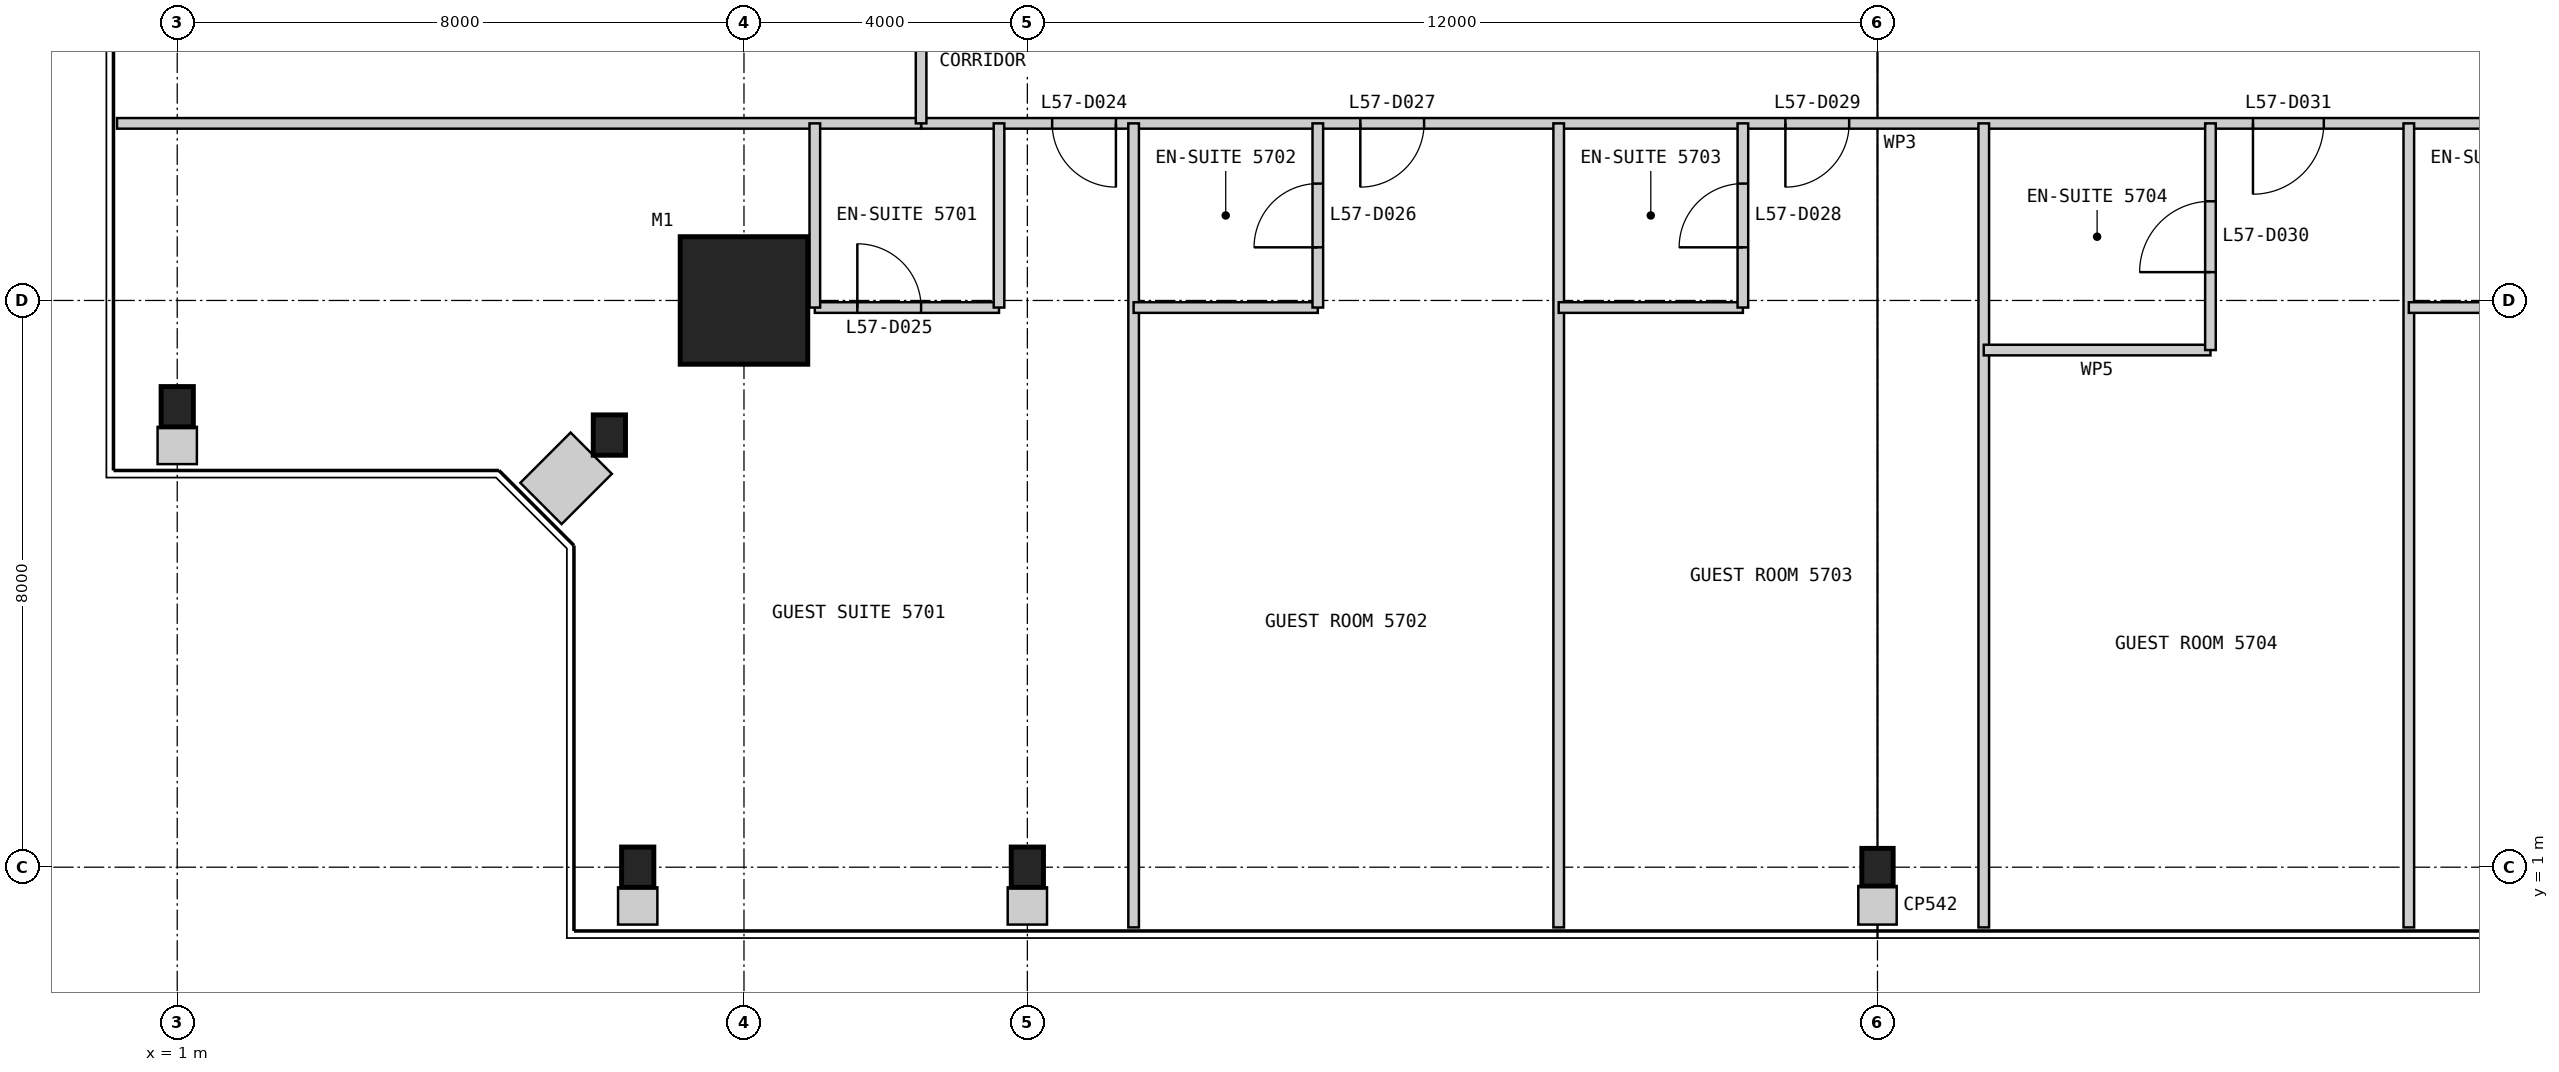
"""IFC4 building model, lengths in metres.
Left out: names, types, materials, properties, quantities, classifications, styles, units other than length and angle.
Written with IfcOpenShell. Run it as: python <this file> out.ifc"""

import sys

from ifc_helpers import new_model, si_unit, direction, frame, frame_2d, origin, origin_2d, place, context, subcontext, project, spatial, rectangle, i_section, extrude, element, fill, save


model = new_model("IFC4")
c1 = context("Model", 3, precision=1e-05, world=origin(), true_north=direction((0.0, 1.0)))
c2 = subcontext(c1, "Body", "Model", "MODEL_VIEW")
j1 = project(units=[si_unit("LENGTHUNIT", "METRE"), si_unit("PLANEANGLEUNIT", "RADIAN")], contexts=[c1])
p1 = place(None, origin())
s1 = spatial("IfcSite", under=j1, at=p1, CompositionType="ELEMENT")
p2 = place(p1, origin())
s2 = spatial("IfcBuilding", under=s1, at=p2, CompositionType="ELEMENT")
p3 = place(p2, frame((0.0, 0.0, 245.8)))
s3 = spatial("IfcBuildingStorey", under=s2, at=p3, CompositionType="ELEMENT", Elevation=245.8)
p4 = place(p3, frame((9.0, 9.0, 0.0), z_axis=(0.0, 0.0, 1.0), x_axis=(1.0, 0.0, 0.0)))
e1 = element("IfcColumn", 1, at=p4, inside=s3, PredefinedType="COLUMN", context=c2, shape_type="SweptSolid", body=[
    extrude(rectangle(XDim=1.8, YDim=1.8, at=origin_2d()), origin(), (0.0, 0.0, 1.0), 3.4),
])
for number, where, z_axis, x_axis in (
    (2, (7.5, 1.0, 0.0), (0.0, 0.0, 1.0), (1.0, 0.0, 0.0)),
    (3, (13.0, 1.0, 0.0), (0.0, 0.0, 1.0), (1.0, 0.0, 0.0)),
):
    element("IfcColumn", number, at=place(p3, frame(where, z_axis=z_axis, x_axis=x_axis)), inside=s3, PredefinedType="COLUMN", context=c2, shape_type="SweptSolid", body=[
        extrude(i_section(OverallWidth=0.455, OverallDepth=0.569, WebThickness=0.078, FlangeThickness=0.125, at=origin_2d()), origin(), (0.0, 0.0, 1.0), 3.4),
    ])
p5 = place(p3, frame((25.0, 1.0, 0.0), z_axis=(0.0, 0.0, 1.0), x_axis=(1.0, 0.0, 0.0)))
e4 = element("IfcColumn", 4, at=p5, inside=s3, PredefinedType="COLUMN", context=c2, shape_type="SweptSolid", body=[
    extrude(i_section(OverallWidth=0.442, OverallDepth=0.531, WebThickness=0.066, FlangeThickness=0.106, at=origin_2d()), origin(), (0.0, 0.0, 1.0), 3.4),
])
for number, where, z_axis, x_axis in (
    (5, (1.0, 7.5, 0.0), (0.0, 0.0, 1.0), (1.0, 0.0, 0.0)),
    (6, (7.1, 7.1, 0.0), (0.0, 0.0, 1.0), (1.0, 0.0, 0.0)),
):
    element("IfcColumn", number, at=place(p3, frame(where, z_axis=z_axis, x_axis=x_axis)), inside=s3, PredefinedType="COLUMN", context=c2, shape_type="SweptSolid", body=[
        extrude(i_section(OverallWidth=0.455, OverallDepth=0.569, WebThickness=0.078, FlangeThickness=0.125, at=origin_2d()), origin(), (0.0, 0.0, 1.0), 3.4),
    ])
p6 = place(p3, frame((11.5, 11.5, 0.0), z_axis=(0.0, 0.0, 1.0), x_axis=(1.0, 0.0, 0.0)))
e7 = element("IfcWall", 7, at=p6, inside=s3, PredefinedType="PARTITIONING", context=c2, shape_type="SweptSolid", body=[
    extrude(rectangle(XDim=27.0, YDim=0.15, at=frame_2d((13.5, 0.0))), origin(), (0.0, 0.0, 1.0), 3.25),
])
p7 = place(p6, frame((1.85, 0.0, 0.0)))
e8 = element("IfcOpeningElement", 8, at=p7, cuts=e7, PredefinedType="OPENING", context=c2, shape_type="SweptSolid", body=[
    extrude(rectangle(XDim=0.9, YDim=2.1, at=frame_2d((0.45, 1.05))), frame((0.0, 0.085, 0.0), z_axis=(0.0, -1.0, 0.0), x_axis=(1.0, 0.0, 0.0)), (0.0, 0.0, 1.0), 0.17),
])
p8 = place(p6, frame((6.2, 0.0, 0.0)))
e9 = element("IfcOpeningElement", 9, at=p8, cuts=e7, PredefinedType="OPENING", context=c2, shape_type="SweptSolid", body=[
    extrude(rectangle(XDim=0.9, YDim=2.1, at=frame_2d((0.45, 1.05))), frame((0.0, 0.085, 0.0), z_axis=(0.0, -1.0, 0.0), x_axis=(1.0, 0.0, 0.0)), (0.0, 0.0, 1.0), 0.17),
])
p9 = place(p6, frame((12.2, 0.0, 0.0)))
e10 = element("IfcOpeningElement", 10, at=p9, cuts=e7, PredefinedType="OPENING", context=c2, shape_type="SweptSolid", body=[
    extrude(rectangle(XDim=0.9, YDim=2.1, at=frame_2d((0.45, 1.05))), frame((0.0, 0.085, 0.0), z_axis=(0.0, -1.0, 0.0), x_axis=(1.0, 0.0, 0.0)), (0.0, 0.0, 1.0), 0.17),
])
p10 = place(p6, frame((18.8, 0.0, 0.0)))
e11 = element("IfcOpeningElement", 11, at=p10, cuts=e7, PredefinedType="OPENING", context=c2, shape_type="SweptSolid", body=[
    extrude(rectangle(XDim=1.0, YDim=2.1, at=frame_2d((0.5, 1.05))), frame((0.0, 0.085, 0.0), z_axis=(0.0, -1.0, 0.0), x_axis=(1.0, 0.0, 0.0)), (0.0, 0.0, 1.0), 0.17),
])
p11 = place(p6, frame((24.2, 0.0, 0.0)))
e12 = element("IfcOpeningElement", 12, at=p11, cuts=e7, PredefinedType="OPENING", context=c2, shape_type="SweptSolid", body=[
    extrude(rectangle(XDim=0.9, YDim=2.1, at=frame_2d((0.45, 1.05))), frame((0.0, 0.085, 0.0), z_axis=(0.0, -1.0, 0.0), x_axis=(1.0, 0.0, 0.0)), (0.0, 0.0, 1.0), 0.17),
])
p12 = place(p3, frame((0.15, 11.5, 0.0), z_axis=(0.0, 0.0, 1.0), x_axis=(1.0, 0.0, 0.0)))
e13 = element("IfcWall", 13, at=p12, inside=s3, PredefinedType="PARTITIONING", context=c2, shape_type="SweptSolid", body=[
    extrude(rectangle(XDim=11.35, YDim=0.15, at=frame_2d((5.675, 0.0))), origin(), (0.0, 0.0, 1.0), 3.25),
])
p13 = place(p3, frame((10.0, 8.9, 0.0), z_axis=(0.0, 0.0, 1.0), x_axis=(1.0, 0.0, 0.0)))
e14 = element("IfcWall", 14, at=p13, inside=s3, PredefinedType="PARTITIONING", context=c2, shape_type="SweptSolid", body=[
    extrude(rectangle(XDim=2.6, YDim=0.15, at=frame_2d((1.3, 0.0))), origin(), (0.0, 0.0, 1.0), 2.638),
])
p14 = place(p13, frame((0.6, 0.0, 0.0)))
e15 = element("IfcOpeningElement", 15, at=p14, cuts=e14, PredefinedType="OPENING", context=c2, shape_type="SweptSolid", body=[
    extrude(rectangle(XDim=0.9, YDim=2.1, at=frame_2d((0.45, 1.05))), frame((0.0, 0.085, 0.0), z_axis=(0.0, -1.0, 0.0), x_axis=(1.0, 0.0, 0.0)), (0.0, 0.0, 1.0), 0.17),
])
for number, where, z_axis, x_axis in (
    (16, (10.0, 8.9, 0.0), (0.0, 0.0, 1.0), (0.0, 1.0, 0.0)),
    (17, (12.6, 8.9, 0.0), (0.0, 0.0, 1.0), (0.0, 1.0, 0.0)),
):
    element("IfcWall", number, at=place(p3, frame(where, z_axis=z_axis, x_axis=x_axis)), inside=s3, PredefinedType="PARTITIONING", context=c2, shape_type="SweptSolid", body=[
        extrude(rectangle(XDim=2.6, YDim=0.15, at=frame_2d((1.3, 0.0))), origin(), (0.0, 0.0, 1.0), 3.25),
    ])
p15 = place(p3, frame((14.5, 0.15, 0.0), z_axis=(0.0, 0.0, 1.0), x_axis=(0.0, 1.0, 0.0)))
e18 = element("IfcWall", 18, at=p15, inside=s3, PredefinedType="PARTITIONING", context=c2, shape_type="SweptSolid", body=[
    extrude(rectangle(XDim=11.35, YDim=0.15, at=frame_2d((5.675, 0.0))), origin(), (0.0, 0.0, 1.0), 3.25),
])
p16 = place(p3, frame((14.5, 8.9, 0.0), z_axis=(0.0, 0.0, 1.0), x_axis=(1.0, 0.0, 0.0)))
e19 = element("IfcWall", 19, at=p16, inside=s3, PredefinedType="PARTITIONING", context=c2, shape_type="SweptSolid", body=[
    extrude(rectangle(XDim=2.6, YDim=0.15, at=frame_2d((1.3, 0.0))), origin(), (0.0, 0.0, 1.0), 3.25),
])
p17 = place(p3, frame((17.1, 8.9, 0.0), z_axis=(0.0, 0.0, 1.0), x_axis=(0.0, 1.0, 0.0)))
e20 = element("IfcWall", 20, at=p17, inside=s3, PredefinedType="PARTITIONING", context=c2, shape_type="SweptSolid", body=[
    extrude(rectangle(XDim=2.6, YDim=0.15, at=frame_2d((1.3, 0.0))), origin(), (0.0, 0.0, 1.0), 3.25),
])
p18 = place(p17, frame((0.85, 0.0, 0.0)))
e21 = element("IfcOpeningElement", 21, at=p18, cuts=e20, PredefinedType="OPENING", context=c2, shape_type="SweptSolid", body=[
    extrude(rectangle(XDim=0.9, YDim=2.1, at=frame_2d((0.45, 1.05))), frame((0.0, 0.085, 0.0), z_axis=(0.0, -1.0, 0.0), x_axis=(1.0, 0.0, 0.0)), (0.0, 0.0, 1.0), 0.17),
])
p19 = place(p3, frame((20.5, 0.15, 0.0), z_axis=(0.0, 0.0, 1.0), x_axis=(0.0, 1.0, 0.0)))
e22 = element("IfcWall", 22, at=p19, inside=s3, PredefinedType="PARTITIONING", context=c2, shape_type="SweptSolid", body=[
    extrude(rectangle(XDim=11.35, YDim=0.15, at=frame_2d((5.675, 0.0))), origin(), (0.0, 0.0, 1.0), 3.25),
])
p20 = place(p3, frame((20.5, 8.9, 0.0), z_axis=(0.0, 0.0, 1.0), x_axis=(1.0, 0.0, 0.0)))
e23 = element("IfcWall", 23, at=p20, inside=s3, PredefinedType="PARTITIONING", context=c2, shape_type="SweptSolid", body=[
    extrude(rectangle(XDim=2.6, YDim=0.15, at=frame_2d((1.3, 0.0))), origin(), (0.0, 0.0, 1.0), 3.25),
])
p21 = place(p3, frame((23.1, 8.9, 0.0), z_axis=(0.0, 0.0, 1.0), x_axis=(0.0, 1.0, 0.0)))
e24 = element("IfcWall", 24, at=p21, inside=s3, PredefinedType="PARTITIONING", context=c2, shape_type="SweptSolid", body=[
    extrude(rectangle(XDim=2.6, YDim=0.15, at=frame_2d((1.3, 0.0))), origin(), (0.0, 0.0, 1.0), 3.25),
])
p22 = place(p21, frame((0.85, 0.0, 0.0)))
e25 = element("IfcOpeningElement", 25, at=p22, cuts=e24, PredefinedType="OPENING", context=c2, shape_type="SweptSolid", body=[
    extrude(rectangle(XDim=0.9, YDim=2.1, at=frame_2d((0.45, 1.05))), frame((0.0, 0.085, 0.0), z_axis=(0.0, -1.0, 0.0), x_axis=(1.0, 0.0, 0.0)), (0.0, 0.0, 1.0), 0.17),
])
p23 = place(p3, frame((26.5, 0.15, 0.0), z_axis=(0.0, 0.0, 1.0), x_axis=(0.0, 1.0, 0.0)))
e26 = element("IfcWall", 26, at=p23, inside=s3, PredefinedType="PARTITIONING", context=c2, shape_type="SweptSolid", body=[
    extrude(rectangle(XDim=11.35, YDim=0.15, at=frame_2d((5.675, 0.0))), origin(), (0.0, 0.0, 1.0), 3.25),
])
p24 = place(p3, frame((26.5, 8.3, 0.0), z_axis=(0.0, 0.0, 1.0), x_axis=(1.0, 0.0, 0.0)))
e27 = element("IfcWall", 27, at=p24, inside=s3, PredefinedType="PARTITIONING", context=c2, shape_type="SweptSolid", body=[
    extrude(rectangle(XDim=3.2, YDim=0.15, at=frame_2d((1.6, 0.0))), origin(), (0.0, 0.0, 1.0), 3.25),
])
p25 = place(p3, frame((29.7, 8.3, 0.0), z_axis=(0.0, 0.0, 1.0), x_axis=(0.0, 1.0, 0.0)))
e28 = element("IfcWall", 28, at=p25, inside=s3, PredefinedType="PARTITIONING", context=c2, shape_type="SweptSolid", body=[
    extrude(rectangle(XDim=3.2, YDim=0.15, at=frame_2d((1.6, 0.0))), origin(), (0.0, 0.0, 1.0), 3.25),
])
p26 = place(p25, frame((1.1, 0.0, 0.0)))
e29 = element("IfcOpeningElement", 29, at=p26, cuts=e28, PredefinedType="OPENING", context=c2, shape_type="SweptSolid", body=[
    extrude(rectangle(XDim=1.0, YDim=2.1, at=frame_2d((0.5, 1.05))), frame((0.0, 0.085, 0.0), z_axis=(0.0, -1.0, 0.0), x_axis=(1.0, 0.0, 0.0)), (0.0, 0.0, 1.0), 0.17),
])
p27 = place(p3, frame((32.5, 0.15, 0.0), z_axis=(0.0, 0.0, 1.0), x_axis=(0.0, 1.0, 0.0)))
e30 = element("IfcWall", 30, at=p27, inside=s3, PredefinedType="PARTITIONING", context=c2, shape_type="SweptSolid", body=[
    extrude(rectangle(XDim=11.35, YDim=0.15, at=frame_2d((5.675, 0.0))), origin(), (0.0, 0.0, 1.0), 3.25),
])
p28 = place(p3, frame((32.5, 8.9, 0.0), z_axis=(0.0, 0.0, 1.0), x_axis=(1.0, 0.0, 0.0)))
e31 = element("IfcWall", 31, at=p28, inside=s3, PredefinedType="PARTITIONING", context=c2, shape_type="SweptSolid", body=[
    extrude(rectangle(XDim=2.6, YDim=0.15, at=frame_2d((1.3, 0.0))), origin(), (0.0, 0.0, 1.0), 3.25),
])
p29 = place(p3, frame((11.5, 38.5, 0.0), z_axis=(0.0, 0.0, 1.0), x_axis=(0.0, -1.0, 0.0)))
e32 = element("IfcWall", 32, at=p29, inside=s3, PredefinedType="PARTITIONING", context=c2, shape_type="SweptSolid", body=[
    extrude(rectangle(XDim=27.0, YDim=0.15, at=frame_2d((13.5, 0.0))), origin(), (0.0, 0.0, 1.0), 3.25),
])
p30 = place(p29, frame((1.85, 0.0, 0.0)))
e33 = element("IfcOpeningElement", 33, at=p30, cuts=e32, PredefinedType="OPENING", context=c2, shape_type="SweptSolid", body=[
    extrude(rectangle(XDim=0.9, YDim=2.1, at=frame_2d((0.45, 1.05))), frame((0.0, 0.085, 0.0), z_axis=(0.0, -1.0, 0.0), x_axis=(1.0, 0.0, 0.0)), (0.0, 0.0, 1.0), 0.17),
])
p31 = place(p29, frame((6.2, 0.0, 0.0)))
e34 = element("IfcOpeningElement", 34, at=p31, cuts=e32, PredefinedType="OPENING", context=c2, shape_type="SweptSolid", body=[
    extrude(rectangle(XDim=0.9, YDim=2.1, at=frame_2d((0.45, 1.05))), frame((0.0, 0.085, 0.0), z_axis=(0.0, -1.0, 0.0), x_axis=(1.0, 0.0, 0.0)), (0.0, 0.0, 1.0), 0.17),
])
p32 = place(p29, frame((12.2, 0.0, 0.0)))
e35 = element("IfcOpeningElement", 35, at=p32, cuts=e32, PredefinedType="OPENING", context=c2, shape_type="SweptSolid", body=[
    extrude(rectangle(XDim=0.9, YDim=2.1, at=frame_2d((0.45, 1.05))), frame((0.0, 0.085, 0.0), z_axis=(0.0, -1.0, 0.0), x_axis=(1.0, 0.0, 0.0)), (0.0, 0.0, 1.0), 0.17),
])
p33 = place(p29, frame((18.2, 0.0, 0.0)))
e36 = element("IfcOpeningElement", 36, at=p33, cuts=e32, PredefinedType="OPENING", context=c2, shape_type="SweptSolid", body=[
    extrude(rectangle(XDim=0.9, YDim=2.1, at=frame_2d((0.45, 1.05))), frame((0.0, 0.085, 0.0), z_axis=(0.0, -1.0, 0.0), x_axis=(1.0, 0.0, 0.0)), (0.0, 0.0, 1.0), 0.17),
])
p34 = place(p29, frame((24.2, 0.0, 0.0)))
e37 = element("IfcOpeningElement", 37, at=p34, cuts=e32, PredefinedType="OPENING", context=c2, shape_type="SweptSolid", body=[
    extrude(rectangle(XDim=0.9, YDim=2.1, at=frame_2d((0.45, 1.05))), frame((0.0, 0.085, 0.0), z_axis=(0.0, -1.0, 0.0), x_axis=(1.0, 0.0, 0.0)), (0.0, 0.0, 1.0), 0.17),
])
for number, where, z_axis, x_axis in (
    (38, (7.5, 0.19, 0.0), (0.0, 0.0, 1.0), (0.0, 1.0, 0.0)),
    (39, (13.0, 0.19, 0.0), (0.0, 0.0, 1.0), (0.0, 1.0, 0.0)),
    (40, (1.0, 6.69, 0.0), (0.0, 0.0, 1.0), (0.0, 1.0, 0.0)),
):
    element("IfcWall", number, at=place(p3, frame(where, z_axis=z_axis, x_axis=x_axis)), inside=s3, PredefinedType="PARTITIONING", context=c2, shape_type="SweptSolid", body=[
        extrude(rectangle(XDim=0.526, YDim=0.555, at=frame_2d((0.263, 0.0))), origin(), (0.0, 0.0, 1.0), 3.25),
    ])
p35 = place(p3, frame((6.134, 6.134, 0.0), z_axis=(0.0, 0.0, 1.0), x_axis=(0.707106781187, 0.707106781187, 0.0)))
e41 = element("IfcWall", 41, at=p35, inside=s3, PredefinedType="PARTITIONING", context=c2, shape_type="SweptSolid", body=[
    extrude(rectangle(XDim=1.004, YDim=0.824, at=frame_2d((0.502, 0.0))), origin(), (0.0, 0.0, 1.0), 3.25),
])
p36 = place(p3, frame((25.0, 0.19, 0.0), z_axis=(0.0, 0.0, 1.0), x_axis=(0.0, 1.0, 0.0)))
e42 = element("IfcWall", 42, at=p36, inside=s3, PredefinedType="PARTITIONING", context=c2, shape_type="SweptSolid", body=[
    extrude(rectangle(XDim=0.545, YDim=0.542, at=frame_2d((0.272, 0.0))), origin(), (0.0, 0.0, 1.0), 3.25),
])
p37 = place(p7, frame((0.9, 0.0, 0.0), z_axis=(0.0, 0.0, 1.0), x_axis=(-1.0, 0.0, 0.0)))
e43 = element("IfcDoor", 43, at=p37, inside=s3, OperationType="SINGLE_SWING_LEFT", PredefinedType="DOOR", context=c2, shape_type="SweptSolid", body=[
    extrude(rectangle(XDim=0.9, YDim=2.1, at=frame_2d((0.45, 1.05))), frame((0.0, 0.025, 0.0), z_axis=(0.0, -1.0, 0.0), x_axis=(1.0, 0.0, 0.0)), (0.0, 0.0, 1.0), 0.05),
])
fill(e8, e43)
p38 = place(p14, origin())
e44 = element("IfcDoor", 44, at=p38, inside=s3, OperationType="SINGLE_SWING_LEFT", PredefinedType="DOOR", context=c2, shape_type="SweptSolid", body=[
    extrude(rectangle(XDim=0.9, YDim=2.1, at=frame_2d((0.45, 1.05))), frame((0.0, 0.025, 0.0), z_axis=(0.0, -1.0, 0.0), x_axis=(1.0, 0.0, 0.0)), (0.0, 0.0, 1.0), 0.05),
])
fill(e15, e44)
p39 = place(p18, origin())
e45 = element("IfcDoor", 45, at=p39, inside=s3, OperationType="SINGLE_SWING_LEFT", PredefinedType="DOOR", context=c2, shape_type="SweptSolid", body=[
    extrude(rectangle(XDim=0.9, YDim=2.1, at=frame_2d((0.45, 1.05))), frame((0.0, 0.025, 0.0), z_axis=(0.0, -1.0, 0.0), x_axis=(1.0, 0.0, 0.0)), (0.0, 0.0, 1.0), 0.05),
])
fill(e21, e45)
p40 = place(p8, frame((0.9, 0.0, 0.0), z_axis=(0.0, 0.0, 1.0), x_axis=(-1.0, 0.0, 0.0)))
e46 = element("IfcDoor", 46, at=p40, inside=s3, OperationType="SINGLE_SWING_RIGHT", PredefinedType="DOOR", context=c2, shape_type="SweptSolid", body=[
    extrude(rectangle(XDim=0.9, YDim=2.1, at=frame_2d((0.45, 1.05))), frame((0.0, 0.025, 0.0), z_axis=(0.0, -1.0, 0.0), x_axis=(1.0, 0.0, 0.0)), (0.0, 0.0, 1.0), 0.05),
])
fill(e9, e46)
p41 = place(p22, origin())
e47 = element("IfcDoor", 47, at=p41, inside=s3, OperationType="SINGLE_SWING_LEFT", PredefinedType="DOOR", context=c2, shape_type="SweptSolid", body=[
    extrude(rectangle(XDim=0.9, YDim=2.1, at=frame_2d((0.45, 1.05))), frame((0.0, 0.025, 0.0), z_axis=(0.0, -1.0, 0.0), x_axis=(1.0, 0.0, 0.0)), (0.0, 0.0, 1.0), 0.05),
])
fill(e25, e47)
p42 = place(p9, frame((0.9, 0.0, 0.0), z_axis=(0.0, 0.0, 1.0), x_axis=(-1.0, 0.0, 0.0)))
e48 = element("IfcDoor", 48, at=p42, inside=s3, OperationType="SINGLE_SWING_RIGHT", PredefinedType="DOOR", context=c2, shape_type="SweptSolid", body=[
    extrude(rectangle(XDim=0.9, YDim=2.1, at=frame_2d((0.45, 1.05))), frame((0.0, 0.025, 0.0), z_axis=(0.0, -1.0, 0.0), x_axis=(1.0, 0.0, 0.0)), (0.0, 0.0, 1.0), 0.05),
])
fill(e10, e48)
p43 = place(p26, origin())
e49 = element("IfcDoor", 49, at=p43, inside=s3, OperationType="SINGLE_SWING_LEFT", PredefinedType="DOOR", context=c2, shape_type="SweptSolid", body=[
    extrude(rectangle(XDim=1.0, YDim=2.1, at=frame_2d((0.5, 1.05))), frame((0.0, 0.025, 0.0), z_axis=(0.0, -1.0, 0.0), x_axis=(1.0, 0.0, 0.0)), (0.0, 0.0, 1.0), 0.05),
])
fill(e29, e49)
p44 = place(p10, frame((1.0, 0.0, 0.0), z_axis=(0.0, 0.0, 1.0), x_axis=(-1.0, 0.0, 0.0)))
e50 = element("IfcDoor", 50, at=p44, inside=s3, OperationType="SINGLE_SWING_RIGHT", PredefinedType="DOOR", context=c2, shape_type="SweptSolid", body=[
    extrude(rectangle(XDim=1.0, YDim=2.1, at=frame_2d((0.5, 1.05))), frame((0.0, 0.025, 0.0), z_axis=(0.0, -1.0, 0.0), x_axis=(1.0, 0.0, 0.0)), (0.0, 0.0, 1.0), 0.05),
])
fill(e11, e50)
save(model, sys.argv[1])
